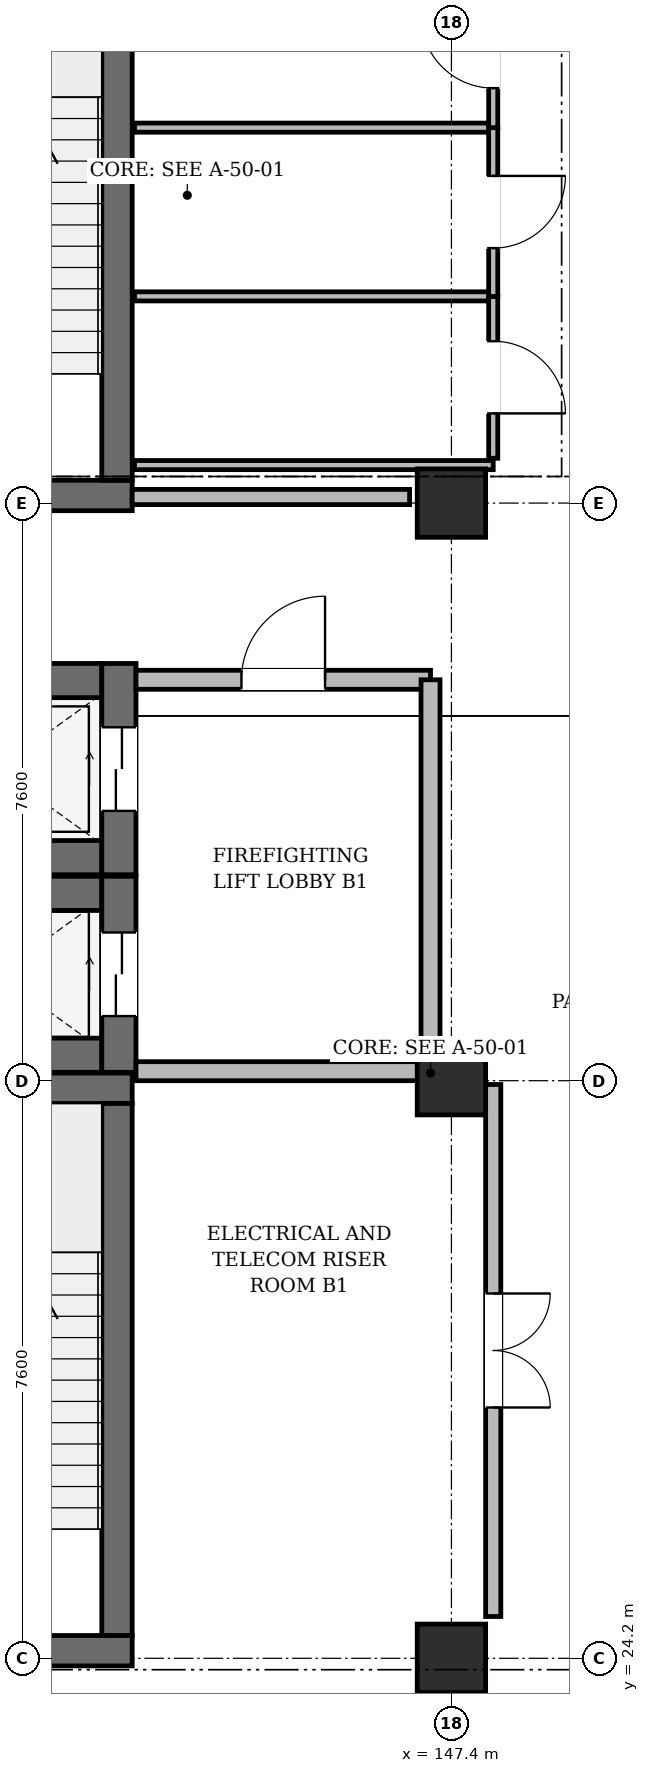
"""IFC4 building model, lengths in metres.
Left out: names, types, materials, properties, quantities, classifications, styles, units other than length and angle.
Written with IfcOpenShell. Run it as: python <this file> out.ifc"""

import sys

from ifc_helpers import new_model, si_unit, direction, frame, frame_2d, origin, origin_2d, place, context, subcontext, project, spatial, rectangle, extrude, element, fill, save


model = new_model("IFC4")
c1 = context("Model", 3, precision=1e-05, world=origin(), true_north=direction((0.0, 1.0)))
c2 = subcontext(c1, "Body", "Model", "MODEL_VIEW")
j1 = project(units=[si_unit("LENGTHUNIT", "METRE"), si_unit("PLANEANGLEUNIT", "RADIAN")], contexts=[c1])
p1 = place(None, origin())
s1 = spatial("IfcSite", under=j1, at=p1, CompositionType="ELEMENT")
p2 = place(p1, origin())
s2 = spatial("IfcBuilding", under=s1, at=p2, CompositionType="ELEMENT")
p3 = place(p2, frame((0.0, 0.0, -4.8)))
s3 = spatial("IfcBuildingStorey", under=s2, at=p3, CompositionType="ELEMENT", Elevation=-4.8)
for number, where, z_axis, x_axis in (
    (1, (147.4, 24.2, 0.0), (0.0, 0.0, 1.0), (1.0, 0.0, 0.0)),
    (2, (147.4, 31.8, 0.0), (0.0, 0.0, 1.0), (1.0, 0.0, 0.0)),
    (3, (147.4, 39.4, 0.0), (0.0, 0.0, 1.0), (1.0, 0.0, 0.0)),
):
    element("IfcColumn", number, at=place(p3, frame(where, z_axis=z_axis, x_axis=x_axis)), inside=s3, PredefinedType="COLUMN", context=c2, shape_type="SweptSolid", body=[
        extrude(rectangle(XDim=0.9, YDim=0.9, at=origin_2d()), origin(), (0.0, 0.0, 1.0), 4.46),
    ])
p4 = place(p3, frame((139.4, 24.3, 0.0), z_axis=(0.0, 0.0, 1.0), x_axis=(1.0, 0.0, 0.0)))
e4 = element("IfcWall", 4, at=p4, inside=s3, PredefinedType="SHEAR", context=c2, shape_type="SweptSolid", body=[
    extrude(rectangle(XDim=3.8, YDim=0.4, at=frame_2d((1.9, 0.0))), origin(), (0.0, 0.0, 1.0), 4.46),
])
p5 = place(p4, frame((1.3, 0.0, 0.0)))
e5 = element("IfcOpeningElement", 5, at=p5, cuts=e4, PredefinedType="OPENING", context=c2, shape_type="SweptSolid", body=[
    extrude(rectangle(XDim=1.2, YDim=2.2, at=frame_2d((0.6, 1.1))), frame((0.0, 0.212, 0.0), z_axis=(0.0, -1.0, 0.0), x_axis=(1.0, 0.0, 0.0)), (0.0, 0.0, 1.0), 0.424),
])
p6 = place(p3, frame((139.4, 31.7, 0.0), z_axis=(0.0, 0.0, 1.0), x_axis=(1.0, 0.0, 0.0)))
e6 = element("IfcWall", 6, at=p6, inside=s3, PredefinedType="SHEAR", context=c2, shape_type="SweptSolid", body=[
    extrude(rectangle(XDim=3.8, YDim=0.4, at=frame_2d((1.9, 0.0))), origin(), (0.0, 0.0, 1.0), 4.46),
])
p7 = place(p3, frame((143.0, 24.5, 0.0), z_axis=(0.0, 0.0, 1.0), x_axis=(0.0, 1.0, 0.0)))
e7 = element("IfcWall", 7, at=p7, inside=s3, PredefinedType="SHEAR", context=c2, shape_type="SweptSolid", body=[
    extrude(rectangle(XDim=7.0, YDim=0.4, at=frame_2d((3.5, 0.0))), origin(), (0.0, 0.0, 1.0), 4.46),
])
p8 = place(p3, frame((139.4, 39.5, 0.0), z_axis=(0.0, 0.0, 1.0), x_axis=(1.0, 0.0, 0.0)))
e8 = element("IfcWall", 8, at=p8, inside=s3, PredefinedType="SHEAR", context=c2, shape_type="SweptSolid", body=[
    extrude(rectangle(XDim=3.8, YDim=0.4, at=frame_2d((1.9, 0.0))), origin(), (0.0, 0.0, 1.0), 4.46),
])
p9 = place(p8, frame((1.3, 0.0, 0.0)))
e9 = element("IfcOpeningElement", 9, at=p9, cuts=e8, PredefinedType="OPENING", context=c2, shape_type="SweptSolid", body=[
    extrude(rectangle(XDim=1.2, YDim=2.2, at=frame_2d((0.6, 1.1))), frame((0.0, 0.212, 0.0), z_axis=(0.0, -1.0, 0.0), x_axis=(1.0, 0.0, 0.0)), (0.0, 0.0, 1.0), 0.424),
])
p10 = place(p3, frame((143.0, 39.7, 0.0), z_axis=(0.0, 0.0, 1.0), x_axis=(0.0, 1.0, 0.0)))
e10 = element("IfcWall", 10, at=p10, inside=s3, PredefinedType="SHEAR", context=c2, shape_type="SweptSolid", body=[
    extrude(rectangle(XDim=7.0, YDim=0.4, at=frame_2d((3.5, 0.0))), origin(), (0.0, 0.0, 1.0), 4.46),
])
for number, where, z_axis, x_axis in (
    (11, (140.06, 32.135, 0.0), (0.0, 0.0, 1.0), (1.0, 0.0, 0.0)),
    (12, (140.06, 34.265, 0.0), (0.0, 0.0, 1.0), (1.0, 0.0, 0.0)),
):
    element("IfcWall", number, at=place(p3, frame(where, z_axis=z_axis, x_axis=x_axis)), inside=s3, PredefinedType="SHEAR", context=c2, shape_type="SweptSolid", body=[
        extrude(rectangle(XDim=2.74, YDim=0.45, at=frame_2d((1.37, 0.0))), origin(), (0.0, 0.0, 1.0), 4.46),
    ])
p11 = place(p3, frame((143.025, 31.91, 0.0), z_axis=(0.0, 0.0, 1.0), x_axis=(0.0, 1.0, 0.0)))
e13 = element("IfcWall", 13, at=p11, inside=s3, PredefinedType="SHEAR", context=c2, shape_type="SweptSolid", body=[
    extrude(rectangle(XDim=2.58, YDim=0.45, at=frame_2d((1.29, 0.0))), origin(), (0.0, 0.0, 1.0), 4.46),
])
p12 = place(p11, frame((0.74, 0.0, 0.0)))
e14 = element("IfcOpeningElement", 14, at=p12, cuts=e13, PredefinedType="OPENING", context=c2, shape_type="SweptSolid", body=[
    extrude(rectangle(XDim=1.1, YDim=2.2, at=frame_2d((0.55, 1.1))), frame((0.0, 0.237, 0.0), z_axis=(0.0, -1.0, 0.0), x_axis=(1.0, 0.0, 0.0)), (0.0, 0.0, 1.0), 0.474),
])
for number, where, z_axis, x_axis in (
    (15, (140.06, 34.735, 0.0), (0.0, 0.0, 1.0), (1.0, 0.0, 0.0)),
    (16, (140.06, 37.065, 0.0), (0.0, 0.0, 1.0), (1.0, 0.0, 0.0)),
):
    element("IfcWall", number, at=place(p3, frame(where, z_axis=z_axis, x_axis=x_axis)), inside=s3, PredefinedType="SHEAR", context=c2, shape_type="SweptSolid", body=[
        extrude(rectangle(XDim=2.74, YDim=0.45, at=frame_2d((1.37, 0.0))), origin(), (0.0, 0.0, 1.0), 4.46),
    ])
p13 = place(p3, frame((143.025, 34.51, 0.0), z_axis=(0.0, 0.0, 1.0), x_axis=(0.0, 1.0, 0.0)))
e17 = element("IfcWall", 17, at=p13, inside=s3, PredefinedType="SHEAR", context=c2, shape_type="SweptSolid", body=[
    extrude(rectangle(XDim=2.78, YDim=0.45, at=frame_2d((1.39, 0.0))), origin(), (0.0, 0.0, 1.0), 4.46),
])
p14 = place(p13, frame((0.84, 0.0, 0.0)))
e18 = element("IfcOpeningElement", 18, at=p14, cuts=e17, PredefinedType="OPENING", context=c2, shape_type="SweptSolid", body=[
    extrude(rectangle(XDim=1.1, YDim=2.2, at=frame_2d((0.55, 1.1))), frame((0.0, 0.237, 0.0), z_axis=(0.0, -1.0, 0.0), x_axis=(1.0, 0.0, 0.0)), (0.0, 0.0, 1.0), 0.474),
])
p15 = place(p3, frame((143.25, 37.075, 0.0), z_axis=(0.0, 0.0, 1.0), x_axis=(1.0, 0.0, 0.0)))
e19 = element("IfcWall", 19, at=p15, inside=s3, PredefinedType="SOLIDWALL", context=c2, shape_type="SweptSolid", body=[
    extrude(rectangle(XDim=3.875, YDim=0.25, at=frame_2d((1.938, 0.0))), origin(), (0.0, 0.0, 1.0), 4.405),
])
p16 = place(p15, frame((1.387, 0.0, 0.0)))
e20 = element("IfcOpeningElement", 20, at=p16, cuts=e19, PredefinedType="OPENING", context=c2, shape_type="SweptSolid", body=[
    extrude(rectangle(XDim=1.1, YDim=2.2, at=frame_2d((0.55, 1.1))), frame((0.0, 0.137, 0.0), z_axis=(0.0, -1.0, 0.0), x_axis=(1.0, 0.0, 0.0)), (0.0, 0.0, 1.0), 0.274),
])
p17 = place(p3, frame((143.25, 31.925, 0.0), z_axis=(0.0, 0.0, 1.0), x_axis=(1.0, 0.0, 0.0)))
e21 = element("IfcWall", 21, at=p17, inside=s3, PredefinedType="SOLIDWALL", context=c2, shape_type="SweptSolid", body=[
    extrude(rectangle(XDim=3.875, YDim=0.25, at=frame_2d((1.938, 0.0))), origin(), (0.0, 0.0, 1.0), 3.595),
])
p18 = place(p3, frame((147.125, 31.925, 0.0), z_axis=(0.0, 0.0, 1.0), x_axis=(0.0, 1.0, 0.0)))
e22 = element("IfcWall", 22, at=p18, inside=s3, PredefinedType="SOLIDWALL", context=c2, shape_type="SweptSolid", body=[
    extrude(rectangle(XDim=5.15, YDim=0.25, at=frame_2d((2.575, 0.0))), origin(), (0.0, 0.0, 1.0), 3.595),
])
p19 = place(p3, frame((143.23, 39.9, 0.0), z_axis=(0.0, 0.0, 1.0), x_axis=(1.0, 0.0, 0.0)))
e23 = element("IfcWall", 23, at=p19, inside=s3, PredefinedType="PARTITIONING", context=c2, shape_type="SweptSolid", body=[
    extrude(rectangle(XDim=4.72, YDim=0.12, at=frame_2d((2.36, 0.0))), origin(), (0.0, 0.0, 1.0), 4.405),
])
p20 = place(p3, frame((147.95, 31.75, 0.0), z_axis=(0.0, 0.0, 1.0), x_axis=(0.0, -1.0, 0.0)))
e24 = element("IfcWall", 24, at=p20, inside=s3, PredefinedType="PARTITIONING", context=c2, shape_type="SweptSolid", body=[
    extrude(rectangle(XDim=7.0, YDim=0.2, at=frame_2d((3.5, 0.0))), origin(), (0.0, 0.0, 1.0), 4.405),
])
p21 = place(p20, frame((2.75, 0.0, 0.0)))
e25 = element("IfcOpeningElement", 25, at=p21, cuts=e24, PredefinedType="OPENING", context=c2, shape_type="SweptSolid", body=[
    extrude(rectangle(XDim=1.5, YDim=2.2, at=frame_2d((0.75, 1.1))), frame((0.0, 0.112, 0.0), z_axis=(0.0, -1.0, 0.0), x_axis=(1.0, 0.0, 0.0)), (0.0, 0.0, 1.0), 0.224),
])
p22 = place(p3, frame((143.23, 42.12, 0.0), z_axis=(0.0, 0.0, 1.0), x_axis=(1.0, 0.0, 0.0)))
e26 = element("IfcWall", 26, at=p22, inside=s3, PredefinedType="PARTITIONING", context=c2, shape_type="SweptSolid", body=[
    extrude(rectangle(XDim=4.72, YDim=0.12, at=frame_2d((2.36, 0.0))), origin(), (0.0, 0.0, 1.0), 3.935),
])
p23 = place(p3, frame((147.95, 42.12, 0.0), z_axis=(0.0, 0.0, 1.0), x_axis=(0.0, -1.0, 0.0)))
e27 = element("IfcWall", 27, at=p23, inside=s3, PredefinedType="PARTITIONING", context=c2, shape_type="SweptSolid", body=[
    extrude(rectangle(XDim=2.13, YDim=0.12, at=frame_2d((1.065, 0.0))), origin(), (0.0, 0.0, 1.0), 4.405),
])
p24 = place(p23, frame((0.59, 0.0, 0.0)))
e28 = element("IfcOpeningElement", 28, at=p24, cuts=e27, PredefinedType="OPENING", context=c2, shape_type="SweptSolid", body=[
    extrude(rectangle(XDim=0.95, YDim=2.15, at=frame_2d((0.475, 1.075))), frame((0.0, 0.072, 0.0), z_axis=(0.0, -1.0, 0.0), x_axis=(1.0, 0.0, 0.0)), (0.0, 0.0, 1.0), 0.144),
])
p25 = place(p3, frame((143.23, 44.34, 0.0), z_axis=(0.0, 0.0, 1.0), x_axis=(1.0, 0.0, 0.0)))
e29 = element("IfcWall", 29, at=p25, inside=s3, PredefinedType="PARTITIONING", context=c2, shape_type="SweptSolid", body=[
    extrude(rectangle(XDim=4.72, YDim=0.12, at=frame_2d((2.36, 0.0))), origin(), (0.0, 0.0, 1.0), 3.885),
])
p26 = place(p3, frame((147.95, 44.34, 0.0), z_axis=(0.0, 0.0, 1.0), x_axis=(0.0, -1.0, 0.0)))
e30 = element("IfcWall", 30, at=p26, inside=s3, PredefinedType="PARTITIONING", context=c2, shape_type="SweptSolid", body=[
    extrude(rectangle(XDim=2.22, YDim=0.12, at=frame_2d((1.11, 0.0))), origin(), (0.0, 0.0, 1.0), 4.405),
])
p27 = place(p26, frame((0.635, 0.0, 0.0)))
e31 = element("IfcOpeningElement", 31, at=p27, cuts=e30, PredefinedType="OPENING", context=c2, shape_type="SweptSolid", body=[
    extrude(rectangle(XDim=0.95, YDim=2.15, at=frame_2d((0.475, 1.075))), frame((0.0, 0.072, 0.0), z_axis=(0.0, -1.0, 0.0), x_axis=(1.0, 0.0, 0.0)), (0.0, 0.0, 1.0), 0.144),
])
p28 = place(p3, frame((147.95, 46.33, 0.0), z_axis=(0.0, 0.0, 1.0), x_axis=(0.0, -1.0, 0.0)))
e32 = element("IfcWall", 32, at=p28, inside=s3, PredefinedType="PARTITIONING", context=c2, shape_type="SweptSolid", body=[
    extrude(rectangle(XDim=1.99, YDim=0.12, at=frame_2d((0.995, 0.0))), origin(), (0.0, 0.0, 1.0), 4.405),
])
p29 = place(p28, frame((0.52, 0.0, 0.0)))
e33 = element("IfcOpeningElement", 33, at=p29, cuts=e32, PredefinedType="OPENING", context=c2, shape_type="SweptSolid", body=[
    extrude(rectangle(XDim=0.95, YDim=2.15, at=frame_2d((0.475, 1.075))), frame((0.0, 0.072, 0.0), z_axis=(0.0, -1.0, 0.0), x_axis=(1.0, 0.0, 0.0)), (0.0, 0.0, 1.0), 0.144),
])
p30 = place(p3, frame((143.2, 39.48, 0.0), z_axis=(0.0, 0.0, 1.0), x_axis=(1.0, 0.0, 0.0)))
e34 = element("IfcWall", 34, at=p30, inside=s3, PredefinedType="PARTITIONING", context=c2, shape_type="SweptSolid", body=[
    extrude(rectangle(XDim=3.65, YDim=0.2, at=frame_2d((1.825, 0.0))), origin(), (0.0, 0.0, 1.0), 3.595),
])
p31 = place(p12, origin())
e35 = element("IfcDoor", 35, at=p31, inside=s3, OperationType="DOUBLE_DOOR_SLIDING", PredefinedType="DOOR", context=c2, shape_type="SweptSolid", body=[
    extrude(rectangle(XDim=1.1, YDim=2.2, at=frame_2d((0.55, 1.1))), frame((0.0, 0.025, 0.0), z_axis=(0.0, -1.0, 0.0), x_axis=(1.0, 0.0, 0.0)), (0.0, 0.0, 1.0), 0.05),
])
fill(e14, e35)
p32 = place(p14, origin())
e36 = element("IfcDoor", 36, at=p32, inside=s3, OperationType="DOUBLE_DOOR_SLIDING", PredefinedType="DOOR", context=c2, shape_type="SweptSolid", body=[
    extrude(rectangle(XDim=1.1, YDim=2.2, at=frame_2d((0.55, 1.1))), frame((0.0, 0.025, 0.0), z_axis=(0.0, -1.0, 0.0), x_axis=(1.0, 0.0, 0.0)), (0.0, 0.0, 1.0), 0.05),
])
fill(e18, e36)
p33 = place(p16, origin())
e37 = element("IfcDoor", 37, at=p33, inside=s3, OperationType="SINGLE_SWING_RIGHT", PredefinedType="DOOR", context=c2, shape_type="SweptSolid", body=[
    extrude(rectangle(XDim=1.1, YDim=2.2, at=frame_2d((0.55, 1.1))), frame((0.0, 0.025, 0.0), z_axis=(0.0, -1.0, 0.0), x_axis=(1.0, 0.0, 0.0)), (0.0, 0.0, 1.0), 0.05),
])
fill(e20, e37)
p34 = place(p21, origin())
e38 = element("IfcDoor", 38, at=p34, inside=s3, OperationType="DOUBLE_DOOR_SINGLE_SWING", PredefinedType="DOOR", context=c2, shape_type="SweptSolid", body=[
    extrude(rectangle(XDim=1.5, YDim=2.2, at=frame_2d((0.75, 1.1))), frame((0.0, 0.025, 0.0), z_axis=(0.0, -1.0, 0.0), x_axis=(1.0, 0.0, 0.0)), (0.0, 0.0, 1.0), 0.05),
])
fill(e25, e38)
p35 = place(p24, origin())
e39 = element("IfcDoor", 39, at=p35, inside=s3, OperationType="SINGLE_SWING_RIGHT", PredefinedType="DOOR", context=c2, shape_type="SweptSolid", body=[
    extrude(rectangle(XDim=0.95, YDim=2.15, at=frame_2d((0.475, 1.075))), frame((0.0, 0.025, 0.0), z_axis=(0.0, -1.0, 0.0), x_axis=(1.0, 0.0, 0.0)), (0.0, 0.0, 1.0), 0.05),
])
fill(e28, e39)
p36 = place(p27, origin())
e40 = element("IfcDoor", 40, at=p36, inside=s3, OperationType="SINGLE_SWING_LEFT", PredefinedType="DOOR", context=c2, shape_type="SweptSolid", body=[
    extrude(rectangle(XDim=0.95, YDim=2.15, at=frame_2d((0.475, 1.075))), frame((0.0, 0.025, 0.0), z_axis=(0.0, -1.0, 0.0), x_axis=(1.0, 0.0, 0.0)), (0.0, 0.0, 1.0), 0.05),
])
fill(e31, e40)
p37 = place(p29, frame((0.95, 0.0, 0.0), z_axis=(0.0, 0.0, 1.0), x_axis=(-1.0, 0.0, 0.0)))
e41 = element("IfcDoor", 41, at=p37, inside=s3, OperationType="SINGLE_SWING_RIGHT", PredefinedType="DOOR", context=c2, shape_type="SweptSolid", body=[
    extrude(rectangle(XDim=0.95, YDim=2.15, at=frame_2d((0.475, 1.075))), frame((0.0, 0.025, 0.0), z_axis=(0.0, -1.0, 0.0), x_axis=(1.0, 0.0, 0.0)), (0.0, 0.0, 1.0), 0.05),
])
fill(e33, e41)
save(model, sys.argv[1])
